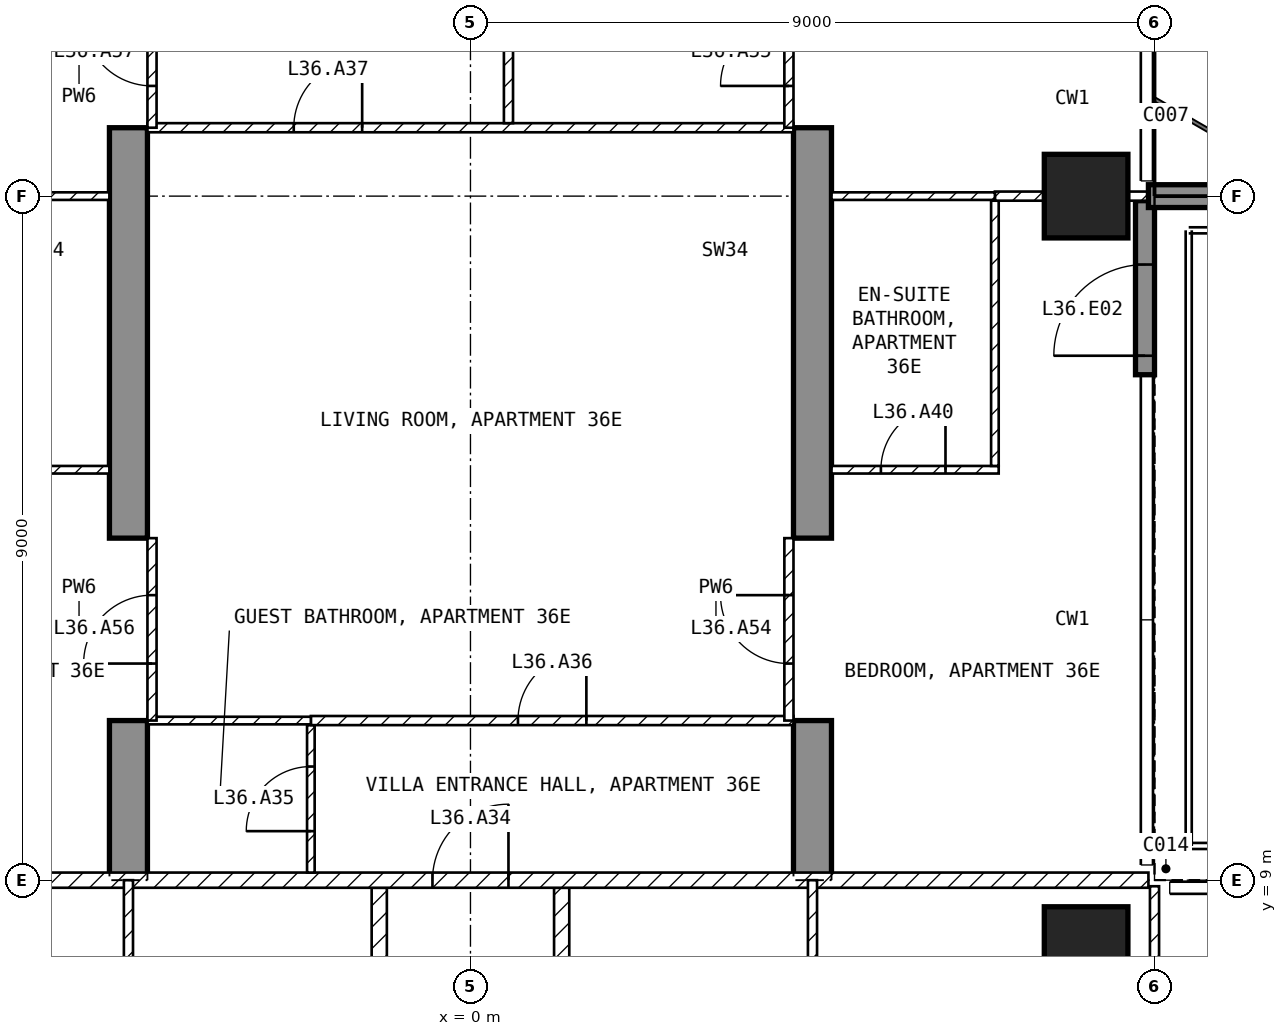
"""IFC4 building model, lengths in metres.
Left out: names, types, materials, properties, quantities, classifications, styles, units other than length and angle.
Written with IfcOpenShell. Run it as: python <this file> out.ifc"""

import sys

from ifc_helpers import new_model, si_unit, direction, frame, frame_2d, origin, origin_2d, place, context, subcontext, project, spatial, polyline, rectangle, outline, extrude, element, fill, save


model = new_model("IFC4")
c1 = context("Model", 3, precision=1e-05, world=origin(), true_north=direction((0.0, 1.0)))
c2 = subcontext(c1, "Body", "Model", "MODEL_VIEW")
j1 = project(units=[si_unit("LENGTHUNIT", "METRE"), si_unit("PLANEANGLEUNIT", "RADIAN")], contexts=[c1])
p1 = place(None, origin())
s1 = spatial("IfcSite", under=j1, at=p1, CompositionType="ELEMENT")
p2 = place(p1, origin())
s2 = spatial("IfcBuilding", under=s1, at=p2, CompositionType="ELEMENT")
p3 = place(p2, frame((0.0, 0.0, 147.9)))
s3 = spatial("IfcBuildingStorey", under=s2, at=p3, CompositionType="ELEMENT", Elevation=147.9)
for number, where, z_axis, x_axis in (
    (1, (8.1, 8.1, -0.25), (0.0, 0.0, 1.0), (1.0, 0.0, 0.0)),
    (2, (8.1, 18.0, -0.25), (0.0, 0.0, 1.0), (1.0, 0.0, 0.0)),
):
    element("IfcColumn", number, at=place(p3, frame(where, z_axis=z_axis, x_axis=x_axis)), inside=s3, PredefinedType="COLUMN", context=c2, shape_type="SweptSolid", body=[
        extrude(rectangle(XDim=1.1, YDim=1.1, at=origin_2d()), origin(), (0.0, 0.0, 1.0), 3.5),
    ])
for number, where, z_axis, x_axis in (
    (3, (-4.75, 9.0, -0.25), (1.0, 0.0, 0.0), (0.0, 1.0, 0.0)),
    (4, (4.25, 9.0, -0.25), (1.0, 0.0, 0.0), (0.0, 1.0, 0.0)),
):
    element("IfcWall", number, at=place(p3, frame(where, z_axis=z_axis, x_axis=x_axis)), inside=s3, PredefinedType="SHEAR", context=c2, shape_type="SweptSolid", body=[
        extrude(outline(polyline([(0.0, 0.0), (2.1, 0.0), (2.1, 2.65), (4.5, 2.65), (4.5, 0.0), (9.9, 0.0), (9.9, 2.65), (12.3, 2.65), (12.3, 0.0), (16.55, 0.0), (16.55, 3.5), (0.0, 3.5), (0.0, 0.0)])), origin(), (0.0, 0.0, 1.0), 0.5),
    ])
p4 = place(p3, frame((8.875, 15.65, 0.0), z_axis=(0.0, 0.0, 1.0), x_axis=(0.0, 1.0, 0.0)))
e5 = element("IfcWall", 5, at=p4, inside=s3, PredefinedType="SOLIDWALL", context=c2, shape_type="SweptSolid", body=[
    extrude(rectangle(XDim=2.29, YDim=0.25, at=frame_2d((1.145, 0.0))), origin(), (0.0, 0.0, 1.0), 3.25),
])
p5 = place(p4, frame((0.25, 0.0, 0.0)))
e6 = element("IfcOpeningElement", 6, at=p5, cuts=e5, PredefinedType="OPENING", context=c2, shape_type="SweptSolid", body=[
    extrude(rectangle(XDim=1.2, YDim=2.4, at=frame_2d((0.6, 1.2))), frame((0.0, 0.135, 0.0), z_axis=(0.0, -1.0, 0.0), x_axis=(1.0, 0.0, 0.0)), (0.0, 0.0, 1.0), 0.27),
])
p6 = place(p3, frame((8.92, 18.0, 0.0), z_axis=(0.0, 0.0, 1.0), x_axis=(1.0, 0.0, 0.0)))
e7 = element("IfcWall", 7, at=p6, inside=s3, PredefinedType="SOLIDWALL", context=c2, shape_type="SweptSolid", body=[
    extrude(rectangle(XDim=2.82, YDim=0.3, at=frame_2d((1.41, 0.0))), origin(), (0.0, 0.0, 1.0), 3.25),
])
for number, where, z_axis, x_axis in (
    (8, (1.2, 8.9, 0.0), (0.0, 0.0, 1.0), (0.0, -1.0, 0.0)),
    (9, (-1.2, 4.6, 0.0), (0.0, 0.0, 1.0), (0.0, 1.0, 0.0)),
):
    element("IfcWall", number, at=place(p3, frame(where, z_axis=z_axis, x_axis=x_axis)), inside=s3, PredefinedType="PARTITIONING", context=c2, shape_type="SweptSolid", body=[
        extrude(rectangle(XDim=4.3, YDim=0.2, at=frame_2d((2.15, 0.0))), origin(), (0.0, 0.0, 1.0), 3.25),
    ])
p7 = place(p3, frame((-8.92, 9.0, 0.0), z_axis=(0.0, 0.0, 1.0), x_axis=(1.0, 0.0, 0.0)))
e10 = element("IfcWall", 10, at=p7, inside=s3, PredefinedType="PARTITIONING", context=c2, shape_type="SweptSolid", body=[
    extrude(rectangle(XDim=17.84, YDim=0.2, at=frame_2d((8.92, 0.0))), origin(), (0.0, 0.0, 1.0), 3.25),
])
p8 = place(p7, frame((8.42, 0.0, 0.0)))
e11 = element("IfcOpeningElement", 11, at=p8, cuts=e10, PredefinedType="OPENING", context=c2, shape_type="SweptSolid", body=[
    extrude(rectangle(XDim=1.0, YDim=2.1, at=frame_2d((0.5, 1.05))), frame((0.0, 0.11, 0.0), z_axis=(0.0, -1.0, 0.0), x_axis=(1.0, 0.0, 0.0)), (0.0, 0.0, 1.0), 0.22),
])
p9 = place(p3, frame((9.0, 4.8, 0.0), z_axis=(0.0, 0.0, 1.0), x_axis=(0.0, 1.0, 0.0)))
e12 = element("IfcWall", 12, at=p9, inside=s3, PredefinedType="PARTITIONING", context=c2, shape_type="SweptSolid", body=[
    extrude(rectangle(XDim=4.12, YDim=0.12, at=frame_2d((2.06, 0.0))), origin(), (0.0, 0.0, 1.0), 3.25),
])
p10 = place(p9, frame((0.7, 0.0, 0.0)))
e13 = element("IfcOpeningElement", 13, at=p10, cuts=e12, PredefinedType="OPENING", context=c2, shape_type="SweptSolid", body=[
    extrude(rectangle(XDim=0.9, YDim=2.1, at=frame_2d((0.45, 1.05))), frame((0.0, 0.07, 0.0), z_axis=(0.0, -1.0, 0.0), x_axis=(1.0, 0.0, 0.0)), (0.0, 0.0, 1.0), 0.14),
])
p11 = place(p3, frame((4.5, 4.5, 0.0), z_axis=(0.0, 0.0, 1.0), x_axis=(0.0, 1.0, 0.0)))
e14 = element("IfcWall", 14, at=p11, inside=s3, PredefinedType="PARTITIONING", context=c2, shape_type="SweptSolid", body=[
    extrude(rectangle(XDim=4.5, YDim=0.12, at=frame_2d((2.25, 0.0))), origin(), (0.0, 0.0, 1.0), 3.25),
])
p12 = place(p11, frame((1.8, 0.0, 0.0)))
e15 = element("IfcOpeningElement", 15, at=p12, cuts=e14, PredefinedType="OPENING", context=c2, shape_type="SweptSolid", body=[
    extrude(rectangle(XDim=0.9, YDim=2.1, at=frame_2d((0.45, 1.05))), frame((0.0, 0.07, 0.0), z_axis=(0.0, -1.0, 0.0), x_axis=(1.0, 0.0, 0.0)), (0.0, 0.0, 1.0), 0.14),
])
p13 = place(p3, frame((-4.5, 9.0, 0.0), z_axis=(0.0, 0.0, 1.0), x_axis=(0.0, -1.0, 0.0)))
e16 = element("IfcWall", 16, at=p13, inside=s3, PredefinedType="PARTITIONING", context=c2, shape_type="SweptSolid", body=[
    extrude(rectangle(XDim=4.5, YDim=0.12, at=frame_2d((2.25, 0.0))), origin(), (0.0, 0.0, 1.0), 3.25),
])
p14 = place(p13, frame((1.8, 0.0, 0.0)))
e17 = element("IfcOpeningElement", 17, at=p14, cuts=e16, PredefinedType="OPENING", context=c2, shape_type="SweptSolid", body=[
    extrude(rectangle(XDim=0.9, YDim=2.1, at=frame_2d((0.45, 1.05))), frame((0.0, 0.07, 0.0), z_axis=(0.0, -1.0, 0.0), x_axis=(1.0, 0.0, 0.0)), (0.0, 0.0, 1.0), 0.14),
])
p15 = place(p3, frame((-2.1, 9.1, 0.0), z_axis=(0.0, 0.0, 1.0), x_axis=(0.0, 1.0, 0.0)))
e18 = element("IfcWall", 18, at=p15, inside=s3, PredefinedType="PARTITIONING", context=c2, shape_type="SweptSolid", body=[
    extrude(rectangle(XDim=1.94, YDim=0.1, at=frame_2d((0.97, 0.0))), origin(), (0.0, 0.0, 1.0), 3.25),
])
p16 = place(p15, frame((0.545, 0.0, 0.0)))
e19 = element("IfcOpeningElement", 19, at=p16, cuts=e18, PredefinedType="OPENING", context=c2, shape_type="SweptSolid", body=[
    extrude(rectangle(XDim=0.85, YDim=2.1, at=frame_2d((0.425, 1.05))), frame((0.0, 0.06, 0.0), z_axis=(0.0, -1.0, 0.0), x_axis=(1.0, 0.0, 0.0)), (0.0, 0.0, 1.0), 0.12),
])
p17 = place(p3, frame((-2.1, 11.1, 0.0), z_axis=(0.0, 0.0, 1.0), x_axis=(1.0, 0.0, 0.0)))
e20 = element("IfcWall", 20, at=p17, inside=s3, PredefinedType="PARTITIONING", context=c2, shape_type="SweptSolid", body=[
    extrude(rectangle(XDim=6.35, YDim=0.12, at=frame_2d((3.175, 0.0))), origin(), (0.0, 0.0, 1.0), 3.25),
])
p18 = place(p17, frame((2.725, 0.0, 0.0)))
e21 = element("IfcOpeningElement", 21, at=p18, cuts=e20, PredefinedType="OPENING", context=c2, shape_type="SweptSolid", body=[
    extrude(rectangle(XDim=0.9, YDim=2.1, at=frame_2d((0.45, 1.05))), frame((0.0, 0.07, 0.0), z_axis=(0.0, -1.0, 0.0), x_axis=(1.0, 0.0, 0.0)), (0.0, 0.0, 1.0), 0.14),
])
p19 = place(p3, frame((-4.25, 11.1, 0.0), z_axis=(0.0, 0.0, 1.0), x_axis=(1.0, 0.0, 0.0)))
e22 = element("IfcWall", 22, at=p19, inside=s3, PredefinedType="PARTITIONING", context=c2, shape_type="SweptSolid", body=[
    extrude(rectangle(XDim=2.15, YDim=0.1, at=frame_2d((1.075, 0.0))), origin(), (0.0, 0.0, 1.0), 3.25),
])
p20 = place(p3, frame((-4.25, 18.9, 0.0), z_axis=(0.0, 0.0, 1.0), x_axis=(1.0, 0.0, 0.0)))
e23 = element("IfcWall", 23, at=p20, inside=s3, PredefinedType="PARTITIONING", context=c2, shape_type="SweptSolid", body=[
    extrude(rectangle(XDim=8.5, YDim=0.12, at=frame_2d((4.25, 0.0))), origin(), (0.0, 0.0, 1.0), 3.25),
])
p21 = place(p20, frame((1.925, 0.0, 0.0)))
e24 = element("IfcOpeningElement", 24, at=p21, cuts=e23, PredefinedType="OPENING", context=c2, shape_type="SweptSolid", body=[
    extrude(rectangle(XDim=0.9, YDim=2.1, at=frame_2d((0.45, 1.05))), frame((0.0, 0.07, 0.0), z_axis=(0.0, -1.0, 0.0), x_axis=(1.0, 0.0, 0.0)), (0.0, 0.0, 1.0), 0.14),
])
p22 = place(p3, frame((0.5, 23.34, 0.0), z_axis=(0.0, 0.0, 1.0), x_axis=(0.0, -1.0, 0.0)))
e25 = element("IfcWall", 25, at=p22, inside=s3, PredefinedType="PARTITIONING", context=c2, shape_type="SweptSolid", body=[
    extrude(rectangle(XDim=4.38, YDim=0.12, at=frame_2d((2.19, 0.0))), origin(), (0.0, 0.0, 1.0), 3.25),
])
p23 = place(p22, frame((1.74, 0.0, 0.0)))
e26 = element("IfcOpeningElement", 26, at=p23, cuts=e25, PredefinedType="OPENING", context=c2, shape_type="SweptSolid", body=[
    extrude(rectangle(XDim=0.9, YDim=2.1, at=frame_2d((0.45, 1.05))), frame((0.0, 0.07, 0.0), z_axis=(0.0, -1.0, 0.0), x_axis=(1.0, 0.0, 0.0)), (0.0, 0.0, 1.0), 0.14),
])
p24 = place(p3, frame((4.75, 14.4, 0.0), z_axis=(0.0, 0.0, 1.0), x_axis=(1.0, 0.0, 0.0)))
e27 = element("IfcWall", 27, at=p24, inside=s3, PredefinedType="PARTITIONING", context=c2, shape_type="SweptSolid", body=[
    extrude(rectangle(XDim=2.2, YDim=0.1, at=frame_2d((1.1, 0.0))), origin(), (0.0, 0.0, 1.0), 3.25),
])
p25 = place(p24, frame((0.65, 0.0, 0.0)))
e28 = element("IfcOpeningElement", 28, at=p25, cuts=e27, PredefinedType="OPENING", context=c2, shape_type="SweptSolid", body=[
    extrude(rectangle(XDim=0.85, YDim=2.1, at=frame_2d((0.425, 1.05))), frame((0.0, 0.06, 0.0), z_axis=(0.0, -1.0, 0.0), x_axis=(1.0, 0.0, 0.0)), (0.0, 0.0, 1.0), 0.12),
])
p26 = place(p3, frame((6.9, 14.45, 0.0), z_axis=(0.0, 0.0, 1.0), x_axis=(0.0, 1.0, 0.0)))
e29 = element("IfcWall", 29, at=p26, inside=s3, PredefinedType="PARTITIONING", context=c2, shape_type="SweptSolid", body=[
    extrude(rectangle(XDim=3.49, YDim=0.1, at=frame_2d((1.745, 0.0))), origin(), (0.0, 0.0, 1.0), 3.25),
])
p27 = place(p3, frame((6.9, 18.0, 0.0), z_axis=(0.0, 0.0, 1.0), x_axis=(1.0, 0.0, 0.0)))
e30 = element("IfcWall", 30, at=p27, inside=s3, PredefinedType="PARTITIONING", context=c2, shape_type="SweptSolid", body=[
    extrude(rectangle(XDim=2.02, YDim=0.12, at=frame_2d((1.01, 0.0))), origin(), (0.0, 0.0, 1.0), 2.414),
])
p28 = place(p3, frame((4.75, 18.0, 0.0), z_axis=(0.0, 0.0, 1.0), x_axis=(1.0, 0.0, 0.0)))
e31 = element("IfcWall", 31, at=p28, inside=s3, PredefinedType="PARTITIONING", context=c2, shape_type="SweptSolid", body=[
    extrude(rectangle(XDim=2.15, YDim=0.1, at=frame_2d((1.075, 0.0))), origin(), (0.0, 0.0, 1.0), 2.414),
])
p29 = place(p3, frame((-6.95, 14.4, 0.0), z_axis=(0.0, 0.0, 1.0), x_axis=(1.0, 0.0, 0.0)))
e32 = element("IfcWall", 32, at=p29, inside=s3, PredefinedType="PARTITIONING", context=c2, shape_type="SweptSolid", body=[
    extrude(rectangle(XDim=2.2, YDim=0.1, at=frame_2d((1.1, 0.0))), origin(), (0.0, 0.0, 1.0), 3.25),
])
p30 = place(p3, frame((-6.9, 18.0, 0.0), z_axis=(0.0, 0.0, 1.0), x_axis=(1.0, 0.0, 0.0)))
e33 = element("IfcWall", 33, at=p30, inside=s3, PredefinedType="PARTITIONING", context=c2, shape_type="SweptSolid", body=[
    extrude(rectangle(XDim=2.15, YDim=0.1, at=frame_2d((1.075, 0.0))), origin(), (0.0, 0.0, 1.0), 2.414),
])
p31 = place(p3, frame((4.19, 11.1, 0.0), z_axis=(0.0, 0.0, 1.0), x_axis=(0.0, 1.0, 0.0)))
e34 = element("IfcWall", 34, at=p31, inside=s3, PredefinedType="PARTITIONING", context=c2, shape_type="SweptSolid", body=[
    extrude(rectangle(XDim=2.4, YDim=0.12, at=frame_2d((1.2, 0.0))), origin(), (0.0, 0.0, 1.0), 2.4),
])
p32 = place(p31, frame((0.75, 0.0, 0.0)))
e35 = element("IfcOpeningElement", 35, at=p32, cuts=e34, PredefinedType="OPENING", context=c2, shape_type="SweptSolid", body=[
    extrude(rectangle(XDim=0.9, YDim=2.1, at=frame_2d((0.45, 1.05))), frame((0.0, 0.07, 0.0), z_axis=(0.0, -1.0, 0.0), x_axis=(1.0, 0.0, 0.0)), (0.0, 0.0, 1.0), 0.14),
])
p33 = place(p3, frame((4.19, 18.9, 0.0), z_axis=(0.0, 0.0, 1.0), x_axis=(0.0, 1.0, 0.0)))
e36 = element("IfcWall", 36, at=p33, inside=s3, PredefinedType="PARTITIONING", context=c2, shape_type="SweptSolid", body=[
    extrude(rectangle(XDim=2.4, YDim=0.12, at=frame_2d((1.2, 0.0))), origin(), (0.0, 0.0, 1.0), 2.4),
])
p34 = place(p33, frame((0.55, 0.0, 0.0)))
e37 = element("IfcOpeningElement", 37, at=p34, cuts=e36, PredefinedType="OPENING", context=c2, shape_type="SweptSolid", body=[
    extrude(rectangle(XDim=0.9, YDim=2.1, at=frame_2d((0.45, 1.05))), frame((0.0, 0.07, 0.0), z_axis=(0.0, -1.0, 0.0), x_axis=(1.0, 0.0, 0.0)), (0.0, 0.0, 1.0), 0.14),
])
p35 = place(p3, frame((-4.19, 11.1, 0.0), z_axis=(0.0, 0.0, 1.0), x_axis=(0.0, 1.0, 0.0)))
e38 = element("IfcWall", 38, at=p35, inside=s3, PredefinedType="PARTITIONING", context=c2, shape_type="SweptSolid", body=[
    extrude(rectangle(XDim=2.4, YDim=0.12, at=frame_2d((1.2, 0.0))), origin(), (0.0, 0.0, 1.0), 2.4),
])
p36 = place(p35, frame((0.75, 0.0, 0.0)))
e39 = element("IfcOpeningElement", 39, at=p36, cuts=e38, PredefinedType="OPENING", context=c2, shape_type="SweptSolid", body=[
    extrude(rectangle(XDim=0.9, YDim=2.1, at=frame_2d((0.45, 1.05))), frame((0.0, 0.07, 0.0), z_axis=(0.0, -1.0, 0.0), x_axis=(1.0, 0.0, 0.0)), (0.0, 0.0, 1.0), 0.14),
])
p37 = place(p3, frame((-4.19, 18.9, 0.0), z_axis=(0.0, 0.0, 1.0), x_axis=(0.0, 1.0, 0.0)))
e40 = element("IfcWall", 40, at=p37, inside=s3, PredefinedType="PARTITIONING", context=c2, shape_type="SweptSolid", body=[
    extrude(rectangle(XDim=2.4, YDim=0.12, at=frame_2d((1.2, 0.0))), origin(), (0.0, 0.0, 1.0), 2.4),
])
p38 = place(p37, frame((0.55, 0.0, 0.0)))
e41 = element("IfcOpeningElement", 41, at=p38, cuts=e40, PredefinedType="OPENING", context=c2, shape_type="SweptSolid", body=[
    extrude(rectangle(XDim=0.9, YDim=2.1, at=frame_2d((0.45, 1.05))), frame((0.0, 0.07, 0.0), z_axis=(0.0, -1.0, 0.0), x_axis=(1.0, 0.0, 0.0)), (0.0, 0.0, 1.0), 0.14),
])
p39 = place(p5, origin())
e42 = element("IfcDoor", 42, at=p39, inside=s3, OperationType="SINGLE_SWING_LEFT", PredefinedType="DOOR", context=c2, shape_type="SweptSolid", body=[
    extrude(rectangle(XDim=1.2, YDim=2.4, at=frame_2d((0.6, 1.2))), frame((0.0, 0.025, 0.0), z_axis=(0.0, -1.0, 0.0), x_axis=(1.0, 0.0, 0.0)), (0.0, 0.0, 1.0), 0.05),
])
fill(e6, e42)
p40 = place(p8, origin())
e43 = element("IfcDoor", 43, at=p40, inside=s3, OperationType="SINGLE_SWING_RIGHT", PredefinedType="DOOR", context=c2, shape_type="SweptSolid", body=[
    extrude(rectangle(XDim=1.0, YDim=2.1, at=frame_2d((0.5, 1.05))), frame((0.0, 0.025, 0.0), z_axis=(0.0, -1.0, 0.0), x_axis=(1.0, 0.0, 0.0)), (0.0, 0.0, 1.0), 0.05),
])
fill(e11, e43)
p41 = place(p16, origin())
e44 = element("IfcDoor", 44, at=p41, inside=s3, OperationType="SINGLE_SWING_LEFT", PredefinedType="DOOR", context=c2, shape_type="SweptSolid", body=[
    extrude(rectangle(XDim=0.85, YDim=2.1, at=frame_2d((0.425, 1.05))), frame((0.0, 0.025, 0.0), z_axis=(0.0, -1.0, 0.0), x_axis=(1.0, 0.0, 0.0)), (0.0, 0.0, 1.0), 0.05),
])
fill(e19, e44)
p42 = place(p18, origin())
e45 = element("IfcDoor", 45, at=p42, inside=s3, OperationType="SINGLE_SWING_RIGHT", PredefinedType="DOOR", context=c2, shape_type="SweptSolid", body=[
    extrude(rectangle(XDim=0.9, YDim=2.1, at=frame_2d((0.45, 1.05))), frame((0.0, 0.025, 0.0), z_axis=(0.0, -1.0, 0.0), x_axis=(1.0, 0.0, 0.0)), (0.0, 0.0, 1.0), 0.05),
])
fill(e21, e45)
p43 = place(p21, origin())
e46 = element("IfcDoor", 46, at=p43, inside=s3, OperationType="SINGLE_SWING_RIGHT", PredefinedType="DOOR", context=c2, shape_type="SweptSolid", body=[
    extrude(rectangle(XDim=0.9, YDim=2.1, at=frame_2d((0.45, 1.05))), frame((0.0, 0.025, 0.0), z_axis=(0.0, -1.0, 0.0), x_axis=(1.0, 0.0, 0.0)), (0.0, 0.0, 1.0), 0.05),
])
fill(e24, e46)
p44 = place(p25, origin())
e47 = element("IfcDoor", 47, at=p44, inside=s3, OperationType="SINGLE_SWING_RIGHT", PredefinedType="DOOR", context=c2, shape_type="SweptSolid", body=[
    extrude(rectangle(XDim=0.85, YDim=2.1, at=frame_2d((0.425, 1.05))), frame((0.0, 0.025, 0.0), z_axis=(0.0, -1.0, 0.0), x_axis=(1.0, 0.0, 0.0)), (0.0, 0.0, 1.0), 0.05),
])
fill(e28, e47)
p45 = place(p32, origin())
e48 = element("IfcDoor", 48, at=p45, inside=s3, OperationType="SINGLE_SWING_RIGHT", PredefinedType="DOOR", context=c2, shape_type="SweptSolid", body=[
    extrude(rectangle(XDim=0.9, YDim=2.1, at=frame_2d((0.45, 1.05))), frame((0.0, 0.025, 0.0), z_axis=(0.0, -1.0, 0.0), x_axis=(1.0, 0.0, 0.0)), (0.0, 0.0, 1.0), 0.05),
])
fill(e35, e48)
p46 = place(p34, origin())
e49 = element("IfcDoor", 49, at=p46, inside=s3, OperationType="SINGLE_SWING_LEFT", PredefinedType="DOOR", context=c2, shape_type="SweptSolid", body=[
    extrude(rectangle(XDim=0.9, YDim=2.1, at=frame_2d((0.45, 1.05))), frame((0.0, 0.025, 0.0), z_axis=(0.0, -1.0, 0.0), x_axis=(1.0, 0.0, 0.0)), (0.0, 0.0, 1.0), 0.05),
])
fill(e37, e49)
p47 = place(p36, origin())
e50 = element("IfcDoor", 50, at=p47, inside=s3, OperationType="SINGLE_SWING_LEFT", PredefinedType="DOOR", context=c2, shape_type="SweptSolid", body=[
    extrude(rectangle(XDim=0.9, YDim=2.1, at=frame_2d((0.45, 1.05))), frame((0.0, 0.025, 0.0), z_axis=(0.0, -1.0, 0.0), x_axis=(1.0, 0.0, 0.0)), (0.0, 0.0, 1.0), 0.05),
])
fill(e39, e50)
p48 = place(p38, origin())
e51 = element("IfcDoor", 51, at=p48, inside=s3, OperationType="SINGLE_SWING_RIGHT", PredefinedType="DOOR", context=c2, shape_type="SweptSolid", body=[
    extrude(rectangle(XDim=0.9, YDim=2.1, at=frame_2d((0.45, 1.05))), frame((0.0, 0.025, 0.0), z_axis=(0.0, -1.0, 0.0), x_axis=(1.0, 0.0, 0.0)), (0.0, 0.0, 1.0), 0.05),
])
fill(e41, e51)
save(model, sys.argv[1])
